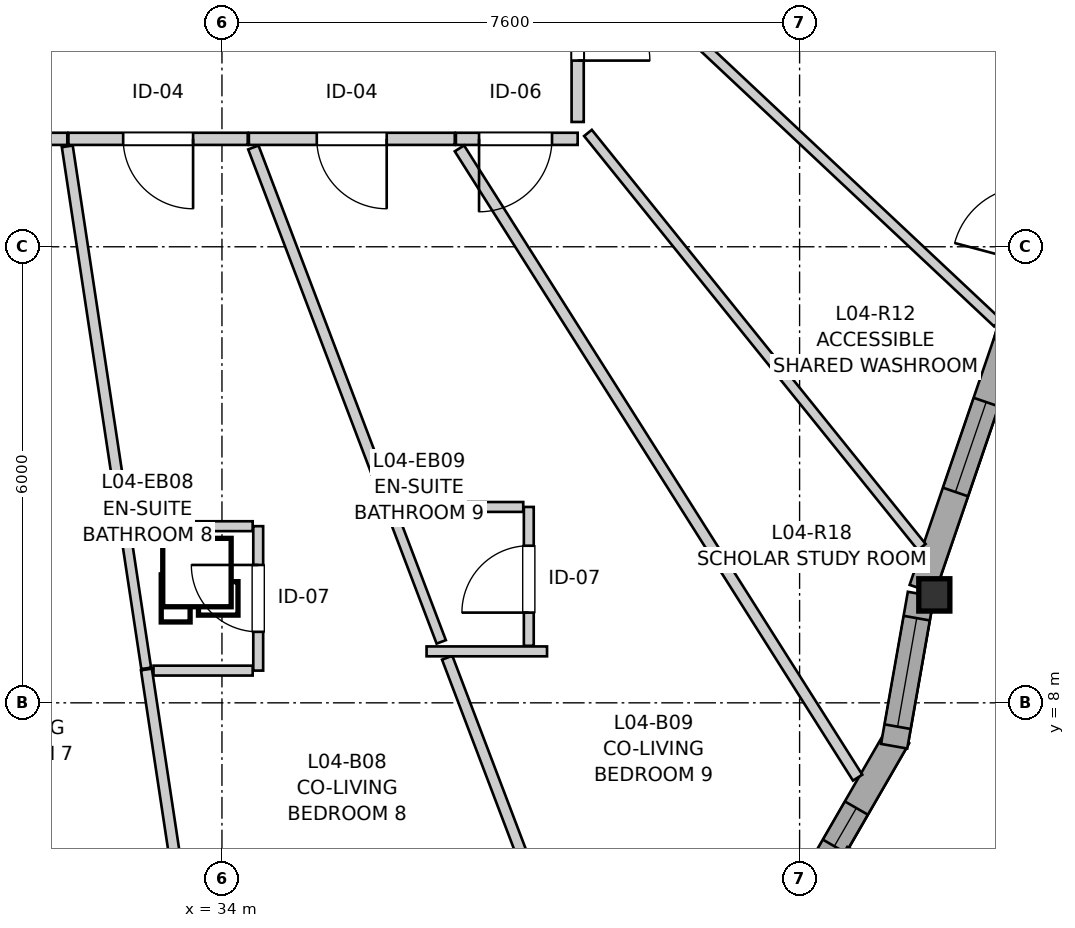
"""IFC4 building model, lengths in metres.
Left out: names, types, materials, properties, quantities, classifications, styles, units other than length and angle.
Written with IfcOpenShell. Run it as: python <this file> out.ifc"""

import sys

from ifc_helpers import new_model, si_unit, direction, frame, frame_2d, origin, origin_2d, place, context, subcontext, project, spatial, rectangle, i_section, extrude, source, transform, mapped, element, fill, save


model = new_model("IFC4")
c1 = context("Model", 3, precision=1e-05, world=origin(), true_north=direction((0.0, 1.0)))
c2 = subcontext(c1, "Body", "Model", "MODEL_VIEW")
j1 = project(units=[si_unit("LENGTHUNIT", "METRE"), si_unit("PLANEANGLEUNIT", "RADIAN")], contexts=[c1])
p1 = place(None, origin())
s1 = spatial("IfcSite", under=j1, at=p1, CompositionType="ELEMENT")
p2 = place(p1, origin())
s2 = spatial("IfcBuilding", under=s1, at=p2, CompositionType="ELEMENT")
p3 = place(p2, frame((0.0, 0.0, 17.4)))
s3 = spatial("IfcBuildingStorey", under=s2, at=p3, CompositionType="ELEMENT", Elevation=17.4)
m1 = source(origin(), c2, "Body", "SweptSolid", [
    extrude(i_section(OverallWidth=0.409, OverallDepth=0.425, WebThickness=0.03, FlangeThickness=0.048, FilletRadius=0.015, at=origin_2d()), origin(), (0.0, 0.0, 1.0), 2.94),
])
p4 = place(p3, frame((43.373, 9.42, 0.0), z_axis=(0.0, 0.0, 1.0), x_axis=(1.0, 0.0, 0.0)))
e1 = element("IfcColumn", 1, at=p4, inside=s3, PredefinedType="PILASTER", context=c2, shape_type="MappedRepresentation", body=[
    mapped(m1, transform((0.0, 0.0, 0.0), x_axis=(1.0, 0.0, 0.0), y_axis=(0.0, 1.0, 0.0), z_axis=(0.0, 0.0, 1.0), scale=1.0)),
])
p5 = place(p3, frame((41.845, 5.746, 0.0), z_axis=(0.0, 0.0, 1.0), x_axis=(0.499995423472, 0.866028046028, 0.0)))
e2 = element("IfcWall", 2, at=p5, inside=s3, PredefinedType="SOLIDWALL", context=c2, shape_type="SweptSolid", body=[
    extrude(rectangle(XDim=2.09, YDim=0.35, at=frame_2d((1.045, 0.0))), origin(), (0.0, 0.0, 1.0), 2.42),
])
p6 = place(p5, frame((0.424, 0.0, 0.82)))
e3 = element("IfcOpeningElement", 3, at=p6, cuts=e2, PredefinedType="OPENING", context=c2, shape_type="SweptSolid", body=[
    extrude(rectangle(XDim=0.58, YDim=1.35, at=frame_2d((0.29, 0.675))), frame((0.0, 0.185, 0.0), z_axis=(0.0, -1.0, 0.0), x_axis=(1.0, 0.0, 0.0)), (0.0, 0.0, 1.0), 0.37),
])
p7 = place(p3, frame((42.844, 7.429, 0.0), z_axis=(0.0, 0.0, 1.0), x_axis=(0.17370309897, 0.984798067326, 0.0)))
e4 = element("IfcWall", 4, at=p7, inside=s3, PredefinedType="SOLIDWALL", context=c2, shape_type="SweptSolid", body=[
    extrude(rectangle(XDim=2.032, YDim=0.35, at=frame_2d((1.016, 0.0))), origin(), (0.0, 0.0, 1.0), 2.42),
])
p8 = place(p7, frame((0.261, 0.0, 0.82)))
e5 = element("IfcOpeningElement", 5, at=p8, cuts=e4, PredefinedType="OPENING", context=c2, shape_type="SweptSolid", body=[
    extrude(rectangle(XDim=1.45, YDim=1.25, at=frame_2d((0.725, 0.625))), frame((0.0, 0.185, 0.0), z_axis=(0.0, -1.0, 0.0), x_axis=(1.0, 0.0, 0.0)), (0.0, 0.0, 1.0), 0.37),
])
p9 = place(p3, frame((43.213, 9.496, 0.0), z_axis=(0.0, 0.0, 1.0), x_axis=(0.323599506414, 0.946194144692, 0.0)))
e6 = element("IfcWall", 6, at=p9, inside=s3, PredefinedType="SOLIDWALL", context=c2, shape_type="SweptSolid", body=[
    extrude(rectangle(XDim=3.522, YDim=0.35, at=frame_2d((1.761, 0.0))), origin(), (0.0, 0.0, 1.0), 2.42),
])
p10 = place(p9, frame((1.351, 0.0, 0.82)))
e7 = element("IfcOpeningElement", 7, at=p10, cuts=e6, PredefinedType="OPENING", context=c2, shape_type="SweptSolid", body=[
    extrude(rectangle(XDim=1.25, YDim=1.35, at=frame_2d((0.625, 0.675))), frame((0.0, 0.185, 0.0), z_axis=(0.0, -1.0, 0.0), x_axis=(1.0, 0.0, 0.0)), (0.0, 0.0, 1.0), 0.37),
])
p11 = place(p3, frame((44.328, 12.744, 0.0), z_axis=(0.0, 0.0, 1.0), x_axis=(0.257063268192, 0.966394575806, 0.0)))
e8 = element("IfcWall", 8, at=p11, inside=s3, PredefinedType="SOLIDWALL", context=c2, shape_type="SweptSolid", body=[
    extrude(rectangle(XDim=3.169, YDim=0.35, at=frame_2d((1.584, 0.0))), origin(), (0.0, 0.0, 1.0), 2.42),
])
p12 = place(p11, frame((1.085, 0.0, 0.0)))
e9 = element("IfcOpeningElement", 9, at=p12, cuts=e8, PredefinedType="OPENING", context=c2, shape_type="SweptSolid", body=[
    extrude(rectangle(XDim=1.0, YDim=2.1, at=frame_2d((0.5, 1.05))), frame((0.0, 0.185, 0.0), z_axis=(0.0, -1.0, 0.0), x_axis=(1.0, 0.0, 0.0)), (0.0, 0.0, 1.0), 0.37),
])
p13 = place(p3, frame((37.063, 15.42, 0.0), z_axis=(0.0, 0.0, 1.0), x_axis=(-1.0, 0.0, 0.0)))
e10 = element("IfcWall", 10, at=p13, inside=s3, PredefinedType="PARTITIONING", context=c2, shape_type="SweptSolid", body=[
    extrude(rectangle(XDim=2.709, YDim=0.16, at=frame_2d((1.354, 0.0))), origin(), (0.0, 0.0, 1.0), 2.94),
])
p14 = place(p13, frame((0.896, 0.0, 0.0)))
e11 = element("IfcOpeningElement", 11, at=p14, cuts=e10, PredefinedType="OPENING", context=c2, shape_type="SweptSolid", body=[
    extrude(rectangle(XDim=0.92, YDim=2.1, at=frame_2d((0.46, 1.05))), frame((0.0, 0.09, 0.0), z_axis=(0.0, -1.0, 0.0), x_axis=(1.0, 0.0, 0.0)), (0.0, 0.0, 1.0), 0.18),
])
p15 = place(p3, frame((31.965, 15.42, 0.0), z_axis=(0.0, 0.0, 1.0), x_axis=(-1.0, 0.0, 0.0)))
e12 = element("IfcWall", 12, at=p15, inside=s3, PredefinedType="PARTITIONING", context=c2, shape_type="SweptSolid", body=[
    extrude(rectangle(XDim=2.598, YDim=0.16, at=frame_2d((1.299, 0.0))), origin(), (0.0, 0.0, 1.0), 2.94),
])
p16 = place(p15, frame((0.862, 0.0, 0.0)))
e13 = element("IfcOpeningElement", 13, at=p16, cuts=e12, PredefinedType="OPENING", context=c2, shape_type="SweptSolid", body=[
    extrude(rectangle(XDim=0.92, YDim=2.1, at=frame_2d((0.46, 1.05))), frame((0.0, 0.09, 0.0), z_axis=(0.0, -1.0, 0.0), x_axis=(1.0, 0.0, 0.0)), (0.0, 0.0, 1.0), 0.18),
])
p17 = place(p3, frame((38.68, 18.147, 0.0), z_axis=(0.0, 0.0, 1.0), x_axis=(0.0, -1.0, 0.0)))
e14 = element("IfcWall", 14, at=p17, inside=s3, PredefinedType="PARTITIONING", context=c2, shape_type="SweptSolid", body=[
    extrude(rectangle(XDim=2.505, YDim=0.16, at=frame_2d((1.252, 0.0))), origin(), (0.0, 0.0, 1.0), 2.94),
])
p18 = place(p17, frame((0.748, 0.0, 0.0)))
e15 = element("IfcOpeningElement", 15, at=p18, cuts=e14, PredefinedType="OPENING", context=c2, shape_type="SweptSolid", body=[
    extrude(rectangle(XDim=0.95, YDim=2.1, at=frame_2d((0.475, 1.05))), frame((0.0, 0.09, 0.0), z_axis=(0.0, -1.0, 0.0), x_axis=(1.0, 0.0, 0.0)), (0.0, 0.0, 1.0), 0.18),
])
p19 = place(p3, frame((34.339, 15.42, 0.0), z_axis=(0.0, 0.0, 1.0), x_axis=(-1.0, 0.0, 0.0)))
e16 = element("IfcWall", 16, at=p19, inside=s3, PredefinedType="PARTITIONING", context=c2, shape_type="SweptSolid", body=[
    extrude(rectangle(XDim=2.359, YDim=0.16, at=frame_2d((1.18, 0.0))), origin(), (0.0, 0.0, 1.0), 2.94),
])
p20 = place(p19, frame((0.719, 0.0, 0.0)))
e17 = element("IfcOpeningElement", 17, at=p20, cuts=e16, PredefinedType="OPENING", context=c2, shape_type="SweptSolid", body=[
    extrude(rectangle(XDim=0.92, YDim=2.1, at=frame_2d((0.46, 1.05))), frame((0.0, 0.09, 0.0), z_axis=(0.0, -1.0, 0.0), x_axis=(1.0, 0.0, 0.0)), (0.0, 0.0, 1.0), 0.18),
])
p21 = place(p3, frame((34.477, 8.424, 0.0), z_axis=(0.0, 0.0, 1.0), x_axis=(0.0, 1.0, 0.0)))
e18 = element("IfcWall", 18, at=p21, inside=s3, PredefinedType="PARTITIONING", context=c2, shape_type="SweptSolid", body=[
    extrude(rectangle(XDim=1.9, YDim=0.13, at=frame_2d((0.95, 0.0))), origin(), (0.0, 0.0, 1.0), 2.94),
])
p22 = place(p21, frame((0.51, 0.0, 0.0)))
e19 = element("IfcOpeningElement", 19, at=p22, cuts=e18, PredefinedType="OPENING", context=c2, shape_type="SweptSolid", body=[
    extrude(rectangle(XDim=0.88, YDim=2.05, at=frame_2d((0.44, 1.025))), frame((0.0, 0.075, 0.0), z_axis=(0.0, -1.0, 0.0), x_axis=(1.0, 0.0, 0.0)), (0.0, 0.0, 1.0), 0.15),
])
p23 = place(p3, frame((38.037, 8.75, 0.0), z_axis=(0.0, 0.0, 1.0), x_axis=(0.0, 1.0, 0.0)))
e20 = element("IfcWall", 20, at=p23, inside=s3, PredefinedType="PARTITIONING", context=c2, shape_type="SweptSolid", body=[
    extrude(rectangle(XDim=1.827, YDim=0.13, at=frame_2d((0.914, 0.0))), origin(), (0.0, 0.0, 1.0), 2.94),
])
p24 = place(p23, frame((0.437, 0.0, 0.0)))
e21 = element("IfcOpeningElement", 21, at=p24, cuts=e20, PredefinedType="OPENING", context=c2, shape_type="SweptSolid", body=[
    extrude(rectangle(XDim=0.88, YDim=2.05, at=frame_2d((0.44, 1.025))), frame((0.0, 0.075, 0.0), z_axis=(0.0, -1.0, 0.0), x_axis=(1.0, 0.0, 0.0)), (0.0, 0.0, 1.0), 0.15),
])
p25 = place(p3, frame((38.68, 15.42, 0.0), z_axis=(0.0, 0.0, 1.0), x_axis=(-1.0, 0.0, 0.0)))
e22 = element("IfcWall", 22, at=p25, inside=s3, PredefinedType="PARTITIONING", context=c2, shape_type="SweptSolid", body=[
    extrude(rectangle(XDim=1.602, YDim=0.16, at=frame_2d((0.801, 0.0))), origin(), (0.0, 0.0, 1.0), 2.94),
])
p26 = place(p25, frame((0.337, 0.0, 0.0)))
e23 = element("IfcOpeningElement", 23, at=p26, cuts=e22, PredefinedType="OPENING", context=c2, shape_type="SweptSolid", body=[
    extrude(rectangle(XDim=0.96, YDim=2.1, at=frame_2d((0.48, 1.05))), frame((0.0, 0.09, 0.0), z_axis=(0.0, -1.0, 0.0), x_axis=(1.0, 0.0, 0.0)), (0.0, 0.0, 1.0), 0.18),
])
p27 = place(p3, frame((37.125, 15.294, 0.0), z_axis=(0.0, 0.0, 1.0), x_axis=(0.534743765269, -0.845014263492, 0.0)))
e24 = element("IfcWall", 24, at=p27, inside=s3, PredefinedType="PARTITIONING", context=c2, shape_type="SweptSolid", body=[
    extrude(rectangle(XDim=9.797, YDim=0.145, at=frame_2d((4.899, 0.0))), origin(), (0.0, 0.0, 1.0), 2.94),
])
p28 = place(p3, frame((38.81, 18.061, 0.0), z_axis=(0.0, 0.0, 1.0), x_axis=(0.729196389153, -0.684304483433, 0.0)))
e25 = element("IfcWall", 25, at=p28, inside=s3, PredefinedType="PARTITIONING", context=c2, shape_type="SweptSolid", body=[
    extrude(rectangle(XDim=7.396, YDim=0.13, at=frame_2d((3.698, 0.0))), origin(), (0.0, 0.0, 1.0), 2.94),
])
p29 = place(p3, frame((38.816, 15.498, 0.0), z_axis=(0.0, 0.0, 1.0), x_axis=(0.627528755525, -0.778593386171, 0.0)))
e26 = element("IfcWall", 26, at=p29, inside=s3, PredefinedType="PARTITIONING", context=c2, shape_type="SweptSolid", body=[
    extrude(rectangle(XDim=6.998, YDim=0.13, at=frame_2d((3.499, 0.0))), origin(), (0.0, 0.0, 1.0), 2.94),
])
p30 = place(p3, frame((34.413, 15.307, 0.0), z_axis=(0.0, 0.0, 1.0), x_axis=(0.355171610573, -0.934801116304, 0.0)))
e27 = element("IfcWall", 27, at=p30, inside=s3, PredefinedType="PARTITIONING", context=c2, shape_type="SweptSolid", body=[
    extrude(rectangle(XDim=5.177, YDim=0.145, at=frame_2d((2.589, 0.0))), origin(), (0.0, 0.0, 1.0), 2.94),
])
p31 = place(p3, frame((31.965, 15.321, 0.0), z_axis=(0.0, 0.0, 1.0), x_axis=(0.149541437001, -0.988755459464, 0.0)))
e28 = element("IfcWall", 28, at=p31, inside=s3, PredefinedType="PARTITIONING", context=c2, shape_type="SweptSolid", body=[
    extrude(rectangle(XDim=5.069, YDim=0.145, at=frame_2d((2.535, 0.0))), origin(), (0.0, 0.0, 1.0), 2.94),
])
p32 = place(p3, frame((36.963, 8.594, 0.0), z_axis=(0.0, 0.0, 1.0), x_axis=(0.35524629266, -0.934772737916, 0.0)))
e29 = element("IfcWall", 29, at=p32, inside=s3, PredefinedType="PARTITIONING", context=c2, shape_type="SweptSolid", body=[
    extrude(rectangle(XDim=4.785, YDim=0.145, at=frame_2d((2.393, 0.0))), origin(), (0.0, 0.0, 1.0), 2.94),
])
p33 = place(p3, frame((33.006, 8.439, 0.0), z_axis=(0.0, 0.0, 1.0), x_axis=(0.149510938207, -0.988760071684, 0.0)))
e30 = element("IfcWall", 30, at=p33, inside=s3, PredefinedType="PARTITIONING", context=c2, shape_type="SweptSolid", body=[
    extrude(rectangle(XDim=3.488, YDim=0.145, at=frame_2d((1.744, 0.0))), origin(), (0.0, 0.0, 1.0), 2.94),
])
p34 = place(p3, frame((36.257, 10.453, 0.0), z_axis=(0.0, 0.0, 1.0), x_axis=(0.355345777079, -0.934734924303, 0.0)))
e31 = element("IfcWall", 31, at=p34, inside=s3, PredefinedType="PARTITIONING", context=c2, shape_type="SweptSolid", body=[
    extrude(rectangle(XDim=1.766, YDim=0.13, at=frame_2d((0.883, 0.0))), origin(), (0.0, 0.0, 1.0), 2.94),
])
p35 = place(p3, frame((32.725, 10.294, 0.0), z_axis=(0.0, 0.0, 1.0), x_axis=(0.149533379282, -0.988756678096, 0.0)))
e32 = element("IfcWall", 32, at=p35, inside=s3, PredefinedType="PARTITIONING", context=c2, shape_type="SweptSolid", body=[
    extrude(rectangle(XDim=1.861, YDim=0.13, at=frame_2d((0.931, 0.0))), origin(), (0.0, 0.0, 1.0), 2.94),
])
p36 = place(p3, frame((36.347, 10.577, 0.0), z_axis=(0.0, 0.0, 1.0), x_axis=(1.0, 0.0, 0.0)))
e33 = element("IfcWall", 33, at=p36, inside=s3, PredefinedType="PARTITIONING", context=c2, shape_type="SweptSolid", body=[
    extrude(rectangle(XDim=1.617, YDim=0.13, at=frame_2d((0.808, 0.0))), origin(), (0.0, 0.0, 1.0), 2.94),
])
p37 = place(p3, frame((32.812, 10.324, 0.0), z_axis=(0.0, 0.0, 1.0), x_axis=(1.0, 0.0, 0.0)))
e34 = element("IfcWall", 34, at=p37, inside=s3, PredefinedType="PARTITIONING", context=c2, shape_type="SweptSolid", body=[
    extrude(rectangle(XDim=1.592, YDim=0.13, at=frame_2d((0.796, 0.0))), origin(), (0.0, 0.0, 1.0), 2.94),
])
p38 = place(p3, frame((33.099, 8.424, 0.0), z_axis=(0.0, 0.0, 1.0), x_axis=(1.0, 0.0, 0.0)))
e35 = element("IfcWall", 35, at=p38, inside=s3, PredefinedType="PARTITIONING", context=c2, shape_type="SweptSolid", body=[
    extrude(rectangle(XDim=1.305, YDim=0.13, at=frame_2d((0.652, 0.0))), origin(), (0.0, 0.0, 1.0), 2.508),
])
p39 = place(p3, frame((36.692, 8.677, 0.0), z_axis=(0.0, 0.0, 1.0), x_axis=(1.0, 0.0, 0.0)))
e36 = element("IfcWall", 36, at=p39, inside=s3, PredefinedType="PARTITIONING", context=c2, shape_type="SweptSolid", body=[
    extrude(rectangle(XDim=1.585, YDim=0.13, at=frame_2d((0.792, 0.0))), origin(), (0.0, 0.0, 1.0), 2.94),
])
m2 = source(origin(), c2, "Body", "SweptSolid", [
    extrude(rectangle(XDim=0.58, YDim=1.35, at=frame_2d((0.29, 0.675))), frame((0.0, 0.03, 0.0), z_axis=(0.0, -1.0, 0.0), x_axis=(1.0, 0.0, 0.0)), (0.0, 0.0, 1.0), 0.06),
])
p40 = place(p6, origin())
e37 = element("IfcWindow", 37, at=p40, inside=s3, PartitioningType="SINGLE_PANEL", PredefinedType="WINDOW", context=c2, shape_type="MappedRepresentation", body=[
    mapped(m2, transform((0.0, 0.0, 0.0), x_axis=(1.0, 0.0, 0.0), y_axis=(0.0, 1.0, 0.0), z_axis=(0.0, 0.0, 1.0), scale=1.0)),
])
fill(e3, e37)
m3 = source(origin(), c2, "Body", "SweptSolid", [
    extrude(rectangle(XDim=1.45, YDim=1.25, at=frame_2d((0.725, 0.625))), frame((0.0, 0.03, 0.0), z_axis=(0.0, -1.0, 0.0), x_axis=(1.0, 0.0, 0.0)), (0.0, 0.0, 1.0), 0.06),
])
p41 = place(p8, origin())
e38 = element("IfcWindow", 38, at=p41, inside=s3, PartitioningType="SINGLE_PANEL", PredefinedType="WINDOW", context=c2, shape_type="MappedRepresentation", body=[
    mapped(m3, transform((0.0, 0.0, 0.0), x_axis=(1.0, 0.0, 0.0), y_axis=(0.0, 1.0, 0.0), z_axis=(0.0, 0.0, 1.0), scale=1.0)),
])
fill(e5, e38)
m4 = source(origin(), c2, "Body", "SweptSolid", [
    extrude(rectangle(XDim=1.25, YDim=1.35, at=frame_2d((0.625, 0.675))), frame((0.0, 0.03, 0.0), z_axis=(0.0, -1.0, 0.0), x_axis=(1.0, 0.0, 0.0)), (0.0, 0.0, 1.0), 0.06),
])
p42 = place(p10, origin())
e39 = element("IfcWindow", 39, at=p42, inside=s3, PartitioningType="SINGLE_PANEL", PredefinedType="WINDOW", context=c2, shape_type="MappedRepresentation", body=[
    mapped(m4, transform((0.0, 0.0, 0.0), x_axis=(1.0, 0.0, 0.0), y_axis=(0.0, 1.0, 0.0), z_axis=(0.0, 0.0, 1.0), scale=1.0)),
])
fill(e7, e39)
m5 = source(origin(), c2, "Body", "SweptSolid", [
    extrude(rectangle(XDim=0.92, YDim=2.1, at=frame_2d((0.46, 1.05))), frame((0.0, 0.025, 0.0), z_axis=(0.0, -1.0, 0.0), x_axis=(1.0, 0.0, 0.0)), (0.0, 0.0, 1.0), 0.05),
])
p43 = place(p14, origin())
e40 = element("IfcDoor", 40, at=p43, inside=s3, OperationType="SINGLE_SWING_LEFT", PredefinedType="DOOR", context=c2, shape_type="MappedRepresentation", body=[
    mapped(m5, transform((0.0, 0.0, 0.0), x_axis=(1.0, 0.0, 0.0), y_axis=(0.0, 1.0, 0.0), z_axis=(0.0, 0.0, 1.0), scale=1.0)),
])
fill(e11, e40)
m6 = source(origin(), c2, "Body", "SweptSolid", [
    extrude(rectangle(XDim=0.95, YDim=2.1, at=frame_2d((0.475, 1.05))), frame((0.0, 0.025, 0.0), z_axis=(0.0, -1.0, 0.0), x_axis=(1.0, 0.0, 0.0)), (0.0, 0.0, 1.0), 0.05),
])
p44 = place(p18, origin())
e41 = element("IfcDoor", 41, at=p44, inside=s3, OperationType="SINGLE_SWING_RIGHT", PredefinedType="DOOR", context=c2, shape_type="MappedRepresentation", body=[
    mapped(m6, transform((0.0, 0.0, 0.0), x_axis=(1.0, 0.0, 0.0), y_axis=(0.0, 1.0, 0.0), z_axis=(0.0, 0.0, 1.0), scale=1.0)),
])
fill(e15, e41)
p45 = place(p20, origin())
e42 = element("IfcDoor", 42, at=p45, inside=s3, OperationType="SINGLE_SWING_LEFT", PredefinedType="DOOR", context=c2, shape_type="MappedRepresentation", body=[
    mapped(m5, transform((0.0, 0.0, 0.0), x_axis=(1.0, 0.0, 0.0), y_axis=(0.0, 1.0, 0.0), z_axis=(0.0, 0.0, 1.0), scale=1.0)),
])
fill(e17, e42)
m7 = source(origin(), c2, "Body", "SweptSolid", [
    extrude(rectangle(XDim=0.88, YDim=2.05, at=frame_2d((0.44, 1.025))), frame((0.0, 0.025, 0.0), z_axis=(0.0, -1.0, 0.0), x_axis=(1.0, 0.0, 0.0)), (0.0, 0.0, 1.0), 0.05),
])
p46 = place(p22, origin())
e43 = element("IfcDoor", 43, at=p46, inside=s3, OperationType="SINGLE_SWING_RIGHT", PredefinedType="DOOR", context=c2, shape_type="MappedRepresentation", body=[
    mapped(m7, transform((0.0, 0.0, 0.0), x_axis=(1.0, 0.0, 0.0), y_axis=(0.0, 1.0, 0.0), z_axis=(0.0, 0.0, 1.0), scale=1.0)),
])
fill(e19, e43)
p47 = place(p24, origin())
e44 = element("IfcDoor", 44, at=p47, inside=s3, OperationType="SINGLE_SWING_LEFT", PredefinedType="DOOR", context=c2, shape_type="MappedRepresentation", body=[
    mapped(m7, transform((0.0, 0.0, 0.0), x_axis=(1.0, 0.0, 0.0), y_axis=(0.0, 1.0, 0.0), z_axis=(0.0, 0.0, 1.0), scale=1.0)),
])
fill(e21, e44)
m8 = source(origin(), c2, "Body", "SweptSolid", [
    extrude(rectangle(XDim=0.96, YDim=2.1, at=frame_2d((0.48, 1.05))), frame((0.0, 0.025, 0.0), z_axis=(0.0, -1.0, 0.0), x_axis=(1.0, 0.0, 0.0)), (0.0, 0.0, 1.0), 0.05),
])
p48 = place(p26, origin())
e45 = element("IfcDoor", 45, at=p48, inside=s3, OperationType="SINGLE_SWING_RIGHT", PredefinedType="DOOR", context=c2, shape_type="MappedRepresentation", body=[
    mapped(m8, transform((0.0, 0.0, 0.0), x_axis=(1.0, 0.0, 0.0), y_axis=(0.0, 1.0, 0.0), z_axis=(0.0, 0.0, 1.0), scale=1.0)),
])
fill(e23, e45)
save(model, sys.argv[1])
